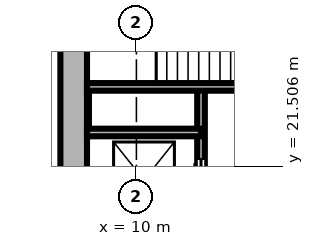
"""IFC4 building model, lengths in metres.
Left out: names, types, materials, properties, quantities, classifications, styles, units other than length and angle.
Written with IfcOpenShell. Run it as: python <this file> out.ifc"""

import sys

from ifc_helpers import new_model, si_unit, direction, frame, frame_2d, origin, place, context, subcontext, project, spatial, rectangle, extrude, element, fill, save


model = new_model("IFC4")
c1 = context("Model", 3, precision=1e-05, world=origin(), true_north=direction((0.0, 1.0)))
c2 = subcontext(c1, "Body", "Model", "MODEL_VIEW")
j1 = project(units=[si_unit("LENGTHUNIT", "METRE"), si_unit("PLANEANGLEUNIT", "RADIAN")], contexts=[c1])
p1 = place(None, origin())
s1 = spatial("IfcSite", under=j1, at=p1, CompositionType="ELEMENT")
p2 = place(p1, origin())
s2 = spatial("IfcBuilding", under=s1, at=p2, CompositionType="ELEMENT")
p3 = place(p2, frame((0.0, 0.0, 190.2)))
s3 = spatial("IfcBuildingStorey", under=s2, at=p3, CompositionType="ELEMENT", Elevation=190.2)
p4 = place(p3, frame((8.35, 27.3, 0.0), z_axis=(0.0, 0.0, 1.0), x_axis=(0.0, -1.0, 0.0)))
e1 = element("IfcWall", 1, at=p4, inside=s3, PredefinedType="SHEAR", context=c2, shape_type="SweptSolid", body=[
    extrude(rectangle(XDim=18.6, YDim=0.7, at=frame_2d((9.3, 0.0))), origin(), (0.0, 0.0, 1.0), 3.9),
])
p5 = place(p3, frame((8.7, 22.4, 0.0), z_axis=(0.0, 0.0, 1.0), x_axis=(1.0, 0.0, 0.0)))
e2 = element("IfcWall", 2, at=p5, inside=s3, PredefinedType="SHEAR", context=c2, shape_type="SweptSolid", body=[
    extrude(rectangle(XDim=3.0, YDim=0.2, at=frame_2d((1.5, 0.0))), origin(), (0.0, 0.0, 1.0), 3.58),
])
p6 = place(p3, frame((8.7, 23.6, 0.0), z_axis=(0.0, 0.0, 1.0), x_axis=(1.0, 0.0, 0.0)))
e3 = element("IfcWall", 3, at=p6, inside=s3, PredefinedType="SHEAR", context=c2, shape_type="SweptSolid", body=[
    extrude(rectangle(XDim=5.1, YDim=0.2, at=frame_2d((2.55, 0.0))), origin(), (0.0, 0.0, 1.0), 3.58),
])
p7 = place(p3, frame((11.7, 12.4, 0.0), z_axis=(0.0, 0.0, 1.0), x_axis=(0.0, 1.0, 0.0)))
e4 = element("IfcWall", 4, at=p7, inside=s3, PredefinedType="SHEAR", context=c2, shape_type="SweptSolid", body=[
    extrude(rectangle(XDim=11.2, YDim=0.2, at=frame_2d((5.6, 0.0))), origin(), (0.0, 0.0, 1.0), 3.58),
])
p8 = place(p7, frame((0.7, 0.0, 0.0)))
e5 = element("IfcOpeningElement", 5, at=p8, cuts=e4, PredefinedType="OPENING", context=c2, shape_type="SweptSolid", body=[
    extrude(rectangle(XDim=1.1, YDim=2.1, at=frame_2d((0.55, 1.05))), frame((0.0, 0.11, 0.0), z_axis=(0.0, -1.0, 0.0), x_axis=(1.0, 0.0, 0.0)), (0.0, 0.0, 1.0), 0.22),
])
p9 = place(p7, frame((3.2, 0.0, 0.0)))
e6 = element("IfcOpeningElement", 6, at=p9, cuts=e4, PredefinedType="OPENING", context=c2, shape_type="SweptSolid", body=[
    extrude(rectangle(XDim=1.1, YDim=2.1, at=frame_2d((0.55, 1.05))), frame((0.0, 0.11, 0.0), z_axis=(0.0, -1.0, 0.0), x_axis=(1.0, 0.0, 0.0)), (0.0, 0.0, 1.0), 0.22),
])
p10 = place(p7, frame((5.7, 0.0, 0.0)))
e7 = element("IfcOpeningElement", 7, at=p10, cuts=e4, PredefinedType="OPENING", context=c2, shape_type="SweptSolid", body=[
    extrude(rectangle(XDim=1.1, YDim=2.1, at=frame_2d((0.55, 1.05))), frame((0.0, 0.11, 0.0), z_axis=(0.0, -1.0, 0.0), x_axis=(1.0, 0.0, 0.0)), (0.0, 0.0, 1.0), 0.22),
])
p11 = place(p7, frame((8.2, 0.0, 0.0)))
e8 = element("IfcOpeningElement", 8, at=p11, cuts=e4, PredefinedType="OPENING", context=c2, shape_type="SweptSolid", body=[
    extrude(rectangle(XDim=1.1, YDim=2.1, at=frame_2d((0.55, 1.05))), frame((0.0, 0.11, 0.0), z_axis=(0.0, -1.0, 0.0), x_axis=(1.0, 0.0, 0.0)), (0.0, 0.0, 1.0), 0.22),
])
p12 = place(p11, origin())
e9 = element("IfcDoor", 9, at=p12, inside=s3, OperationType="DOUBLE_DOOR_SLIDING", PredefinedType="DOOR", context=c2, shape_type="SweptSolid", body=[
    extrude(rectangle(XDim=1.1, YDim=2.1, at=frame_2d((0.55, 1.05))), frame((0.0, 0.025, 0.0), z_axis=(0.0, -1.0, 0.0), x_axis=(1.0, 0.0, 0.0)), (0.0, 0.0, 1.0), 0.05),
])
fill(e8, e9)
save(model, sys.argv[1])
